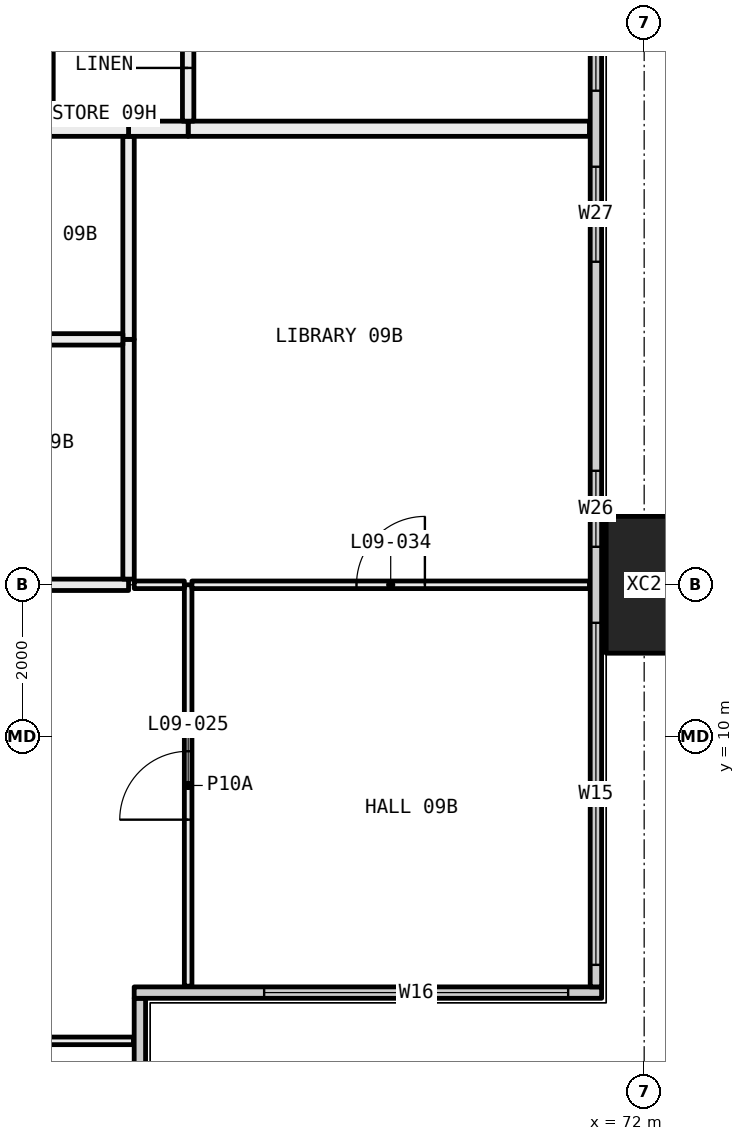
"""IFC4 building model, lengths in metres.
Left out: names, types, materials, properties, quantities, classifications, styles, units other than length and angle.
Written with IfcOpenShell. Run it as: python <this file> out.ifc"""

import sys

from ifc_helpers import new_model, si_unit, direction, frame, frame_2d, origin, origin_2d, place, context, subcontext, project, spatial, rectangle, hollow_rectangle, extrude, element, fill, save


model = new_model("IFC4")
c1 = context("Model", 3, precision=1e-05, world=origin(), true_north=direction((0.0, 1.0)))
c2 = subcontext(c1, "Body", "Model", "MODEL_VIEW")
j1 = project(units=[si_unit("LENGTHUNIT", "METRE"), si_unit("PLANEANGLEUNIT", "RADIAN")], contexts=[c1])
p1 = place(None, origin())
s1 = spatial("IfcSite", under=j1, at=p1, CompositionType="ELEMENT")
p2 = place(p1, origin())
s2 = spatial("IfcBuilding", under=s1, at=p2, CompositionType="ELEMENT")
p3 = place(p2, frame((0.0, 0.0, 43.8)))
s3 = spatial("IfcBuildingStorey", under=s2, at=p3, CompositionType="ELEMENT", Elevation=43.8)
p4 = place(p3, frame((72.0, 12.0, -0.4), z_axis=(0.0, 0.0, 1.0), x_axis=(0.0, 1.0, 0.0)))
e1 = element("IfcColumn", 1, at=p4, inside=s3, PredefinedType="COLUMN", context=c2, shape_type="SweptSolid", body=[
    extrude(hollow_rectangle(XDim=1.8, YDim=1.0, WallThickness=0.07, at=origin_2d()), origin(), (0.0, 0.0, 1.0), 3.45),
])
p5 = place(p3, frame((65.365, 0.71, 0.0), z_axis=(0.0, 0.0, 1.0), x_axis=(0.0, 1.0, 0.0)))
e2 = element("IfcWall", 2, at=p5, inside=s3, PredefinedType="ELEMENTEDWALL", context=c2, shape_type="SweptSolid", body=[
    extrude(rectangle(XDim=5.85, YDim=0.15, at=frame_2d((2.925, 0.0))), origin(), (0.0, 0.0, 1.0), 3.05),
])
p6 = place(p5, frame((0.29, 0.0, 0.45)))
e3 = element("IfcOpeningElement", 3, at=p6, cuts=e2, PredefinedType="OPENING", context=c2, shape_type="SweptSolid", body=[
    extrude(rectangle(XDim=4.0, YDim=2.55, at=frame_2d((2.0, 1.275))), frame((0.0, 0.085, 0.0), z_axis=(0.0, -1.0, 0.0), x_axis=(1.0, 0.0, 0.0)), (0.0, 0.0, 1.0), 0.17),
])
p7 = place(p3, frame((65.29, 6.635, 0.0), z_axis=(0.0, 0.0, 1.0), x_axis=(1.0, 0.0, 0.0)))
e4 = element("IfcWall", 4, at=p7, inside=s3, PredefinedType="ELEMENTEDWALL", context=c2, shape_type="SweptSolid", body=[
    extrude(rectangle(XDim=6.15, YDim=0.15, at=frame_2d((3.075, 0.0))), origin(), (0.0, 0.0, 1.0), 3.05),
])
p8 = place(p7, frame((1.71, 0.0, 0.45)))
e5 = element("IfcOpeningElement", 5, at=p8, cuts=e4, PredefinedType="OPENING", context=c2, shape_type="SweptSolid", body=[
    extrude(rectangle(XDim=4.0, YDim=2.55, at=frame_2d((2.0, 1.275))), frame((0.0, 0.085, 0.0), z_axis=(0.0, -1.0, 0.0), x_axis=(1.0, 0.0, 0.0)), (0.0, 0.0, 1.0), 0.17),
])
p9 = place(p3, frame((71.365, 6.71, 0.0), z_axis=(0.0, 0.0, 1.0), x_axis=(0.0, 1.0, 0.0)))
e6 = element("IfcWall", 6, at=p9, inside=s3, PredefinedType="ELEMENTEDWALL", context=c2, shape_type="SweptSolid", body=[
    extrude(rectangle(XDim=34.58, YDim=0.15, at=frame_2d((17.29, 0.0))), origin(), (0.0, 0.0, 1.0), 3.05),
])
p10 = place(p9, frame((0.29, 0.0, 0.45)))
e7 = element("IfcOpeningElement", 7, at=p10, cuts=e6, PredefinedType="OPENING", context=c2, shape_type="SweptSolid", body=[
    extrude(rectangle(XDim=4.5, YDim=2.55, at=frame_2d((2.25, 1.275))), frame((0.0, 0.085, 0.0), z_axis=(0.0, -1.0, 0.0), x_axis=(1.0, 0.0, 0.0)), (0.0, 0.0, 1.0), 0.17),
])
p11 = place(p9, frame((5.79, 0.0, 0.45)))
e8 = element("IfcOpeningElement", 8, at=p11, cuts=e6, PredefinedType="OPENING", context=c2, shape_type="SweptSolid", body=[
    extrude(rectangle(XDim=1.0, YDim=2.55, at=frame_2d((0.5, 1.275))), frame((0.0, 0.085, 0.0), z_axis=(0.0, -1.0, 0.0), x_axis=(1.0, 0.0, 0.0)), (0.0, 0.0, 1.0), 0.17),
])
p12 = place(p9, frame((9.54, 0.0, 0.45)))
e9 = element("IfcOpeningElement", 9, at=p12, cuts=e6, PredefinedType="OPENING", context=c2, shape_type="SweptSolid", body=[
    extrude(rectangle(XDim=1.25, YDim=2.55, at=frame_2d((0.625, 1.275))), frame((0.0, 0.085, 0.0), z_axis=(0.0, -1.0, 0.0), x_axis=(1.0, 0.0, 0.0)), (0.0, 0.0, 1.0), 0.17),
])
p13 = place(p9, frame((11.79, 0.0, 0.45)))
e10 = element("IfcOpeningElement", 10, at=p13, cuts=e6, PredefinedType="OPENING", context=c2, shape_type="SweptSolid", body=[
    extrude(rectangle(XDim=1.25, YDim=2.55, at=frame_2d((0.625, 1.275))), frame((0.0, 0.085, 0.0), z_axis=(0.0, -1.0, 0.0), x_axis=(1.0, 0.0, 0.0)), (0.0, 0.0, 1.0), 0.17),
])
p14 = place(p9, frame((15.79, 0.0, 0.45)))
e11 = element("IfcOpeningElement", 11, at=p14, cuts=e6, PredefinedType="OPENING", context=c2, shape_type="SweptSolid", body=[
    extrude(rectangle(XDim=1.0, YDim=2.55, at=frame_2d((0.5, 1.275))), frame((0.0, 0.085, 0.0), z_axis=(0.0, -1.0, 0.0), x_axis=(1.0, 0.0, 0.0)), (0.0, 0.0, 1.0), 0.17),
])
p15 = place(p9, frame((17.79, 0.0, 0.45)))
e12 = element("IfcOpeningElement", 12, at=p15, cuts=e6, PredefinedType="OPENING", context=c2, shape_type="SweptSolid", body=[
    extrude(rectangle(XDim=1.0, YDim=2.55, at=frame_2d((0.5, 1.275))), frame((0.0, 0.085, 0.0), z_axis=(0.0, -1.0, 0.0), x_axis=(1.0, 0.0, 0.0)), (0.0, 0.0, 1.0), 0.17),
])
p16 = place(p9, frame((21.54, 0.0, 0.45)))
e13 = element("IfcOpeningElement", 13, at=p16, cuts=e6, PredefinedType="OPENING", context=c2, shape_type="SweptSolid", body=[
    extrude(rectangle(XDim=1.25, YDim=2.55, at=frame_2d((0.625, 1.275))), frame((0.0, 0.085, 0.0), z_axis=(0.0, -1.0, 0.0), x_axis=(1.0, 0.0, 0.0)), (0.0, 0.0, 1.0), 0.17),
])
p17 = place(p9, frame((23.79, 0.0, 0.45)))
e14 = element("IfcOpeningElement", 14, at=p17, cuts=e6, PredefinedType="OPENING", context=c2, shape_type="SweptSolid", body=[
    extrude(rectangle(XDim=1.25, YDim=2.55, at=frame_2d((0.625, 1.275))), frame((0.0, 0.085, 0.0), z_axis=(0.0, -1.0, 0.0), x_axis=(1.0, 0.0, 0.0)), (0.0, 0.0, 1.0), 0.17),
])
p18 = place(p9, frame((27.79, 0.0, 0.45)))
e15 = element("IfcOpeningElement", 15, at=p18, cuts=e6, PredefinedType="OPENING", context=c2, shape_type="SweptSolid", body=[
    extrude(rectangle(XDim=1.0, YDim=2.55, at=frame_2d((0.5, 1.275))), frame((0.0, 0.085, 0.0), z_axis=(0.0, -1.0, 0.0), x_axis=(1.0, 0.0, 0.0)), (0.0, 0.0, 1.0), 0.17),
])
p19 = place(p9, frame((29.79, 0.0, 0.45)))
e16 = element("IfcOpeningElement", 16, at=p19, cuts=e6, PredefinedType="OPENING", context=c2, shape_type="SweptSolid", body=[
    extrude(rectangle(XDim=4.5, YDim=2.55, at=frame_2d((2.25, 1.275))), frame((0.0, 0.085, 0.0), z_axis=(0.0, -1.0, 0.0), x_axis=(1.0, 0.0, 0.0)), (0.0, 0.0, 1.0), 0.17),
])
p20 = place(p3, frame((65.28, 6.0, 0.0), z_axis=(0.0, 0.0, 1.0), x_axis=(-1.0, 0.0, 0.0)))
e17 = element("IfcWall", 17, at=p20, inside=s3, PredefinedType="PARTITIONING", context=c2, shape_type="SweptSolid", body=[
    extrude(rectangle(XDim=5.23, YDim=0.1, at=frame_2d((2.615, 0.0))), origin(), (0.0, 0.0, 1.0), 2.45),
])
p21 = place(p20, frame((2.165, 0.0, 0.0)))
e18 = element("IfcOpeningElement", 18, at=p21, cuts=e17, PredefinedType="OPENING", context=c2, shape_type="SweptSolid", body=[
    extrude(rectangle(XDim=0.9, YDim=2.1, at=frame_2d((0.45, 1.05))), frame((0.0, 0.06, 0.0), z_axis=(0.0, -1.0, 0.0), x_axis=(1.0, 0.0, 0.0)), (0.0, 0.0, 1.0), 0.12),
])
p22 = place(p3, frame((66.0, 6.72, 0.0), z_axis=(0.0, 0.0, 1.0), x_axis=(0.0, 1.0, 0.0)))
e19 = element("IfcWall", 19, at=p22, inside=s3, PredefinedType="PARTITIONING", context=c2, shape_type="SweptSolid", body=[
    extrude(rectangle(XDim=5.28, YDim=0.1, at=frame_2d((2.64, 0.0))), origin(), (0.0, 0.0, 1.0), 2.45),
])
p23 = place(p22, frame((2.19, 0.0, 0.0)))
e20 = element("IfcOpeningElement", 20, at=p23, cuts=e19, PredefinedType="OPENING", context=c2, shape_type="SweptSolid", body=[
    extrude(rectangle(XDim=0.9, YDim=2.1, at=frame_2d((0.45, 1.05))), frame((0.0, 0.06, 0.0), z_axis=(0.0, -1.0, 0.0), x_axis=(1.0, 0.0, 0.0)), (0.0, 0.0, 1.0), 0.12),
])
p24 = place(p3, frame((65.95, 12.0, 0.0), z_axis=(0.0, 0.0, 1.0), x_axis=(-1.0, 0.0, 0.0)))
e21 = element("IfcWall", 21, at=p24, inside=s3, PredefinedType="PARTITIONING", context=c2, shape_type="SweptSolid", body=[
    extrude(rectangle(XDim=0.659, YDim=0.1, at=frame_2d((0.33, 0.0))), origin(), (0.0, 0.0, 1.0), 2.45),
])
p25 = place(p3, frame((65.216, 12.0, 0.0), z_axis=(0.0, 0.0, 1.0), x_axis=(-1.0, 0.0, 0.0)))
e22 = element("IfcWall", 22, at=p25, inside=s3, PredefinedType="PARTITIONING", context=c2, shape_type="SweptSolid", body=[
    extrude(rectangle(XDim=3.716, YDim=0.15, at=frame_2d((1.858, 0.0))), origin(), (0.0, 0.0, 1.0), 2.45),
])
p26 = place(p25, frame((1.408, 0.0, 0.0)))
e23 = element("IfcOpeningElement", 23, at=p26, cuts=e22, PredefinedType="OPENING", context=c2, shape_type="SweptSolid", body=[
    extrude(rectangle(XDim=0.9, YDim=2.1, at=frame_2d((0.45, 1.05))), frame((0.0, 0.085, 0.0), z_axis=(0.0, -1.0, 0.0), x_axis=(1.0, 0.0, 0.0)), (0.0, 0.0, 1.0), 0.17),
])
p27 = place(p3, frame((71.28, 12.0, 0.0), z_axis=(0.0, 0.0, 1.0), x_axis=(-1.0, 0.0, 0.0)))
e24 = element("IfcWall", 24, at=p27, inside=s3, PredefinedType="PARTITIONING", context=c2, shape_type="SweptSolid", body=[
    extrude(rectangle(XDim=5.23, YDim=0.1, at=frame_2d((2.615, 0.0))), origin(), (0.0, 0.0, 1.0), 2.45),
])
p28 = place(p27, frame((2.165, 0.0, 0.0)))
e25 = element("IfcOpeningElement", 25, at=p28, cuts=e24, PredefinedType="OPENING", context=c2, shape_type="SweptSolid", body=[
    extrude(rectangle(XDim=0.9, YDim=2.1, at=frame_2d((0.45, 1.05))), frame((0.0, 0.06, 0.0), z_axis=(0.0, -1.0, 0.0), x_axis=(1.0, 0.0, 0.0)), (0.0, 0.0, 1.0), 0.12),
])
p29 = place(p3, frame((65.216, 15.229, 0.0), z_axis=(0.0, 0.0, 1.0), x_axis=(0.0, -1.0, 0.0)))
e26 = element("IfcWall", 26, at=p29, inside=s3, PredefinedType="PARTITIONING", context=c2, shape_type="SweptSolid", body=[
    extrude(rectangle(XDim=3.154, YDim=0.15, at=frame_2d((1.577, 0.0))), origin(), (0.0, 0.0, 1.0), 2.45),
])
p30 = place(p3, frame((65.216, 17.9, 0.0), z_axis=(0.0, 0.0, 1.0), x_axis=(0.0, -1.0, 0.0)))
e27 = element("IfcWall", 27, at=p30, inside=s3, PredefinedType="PARTITIONING", context=c2, shape_type="SweptSolid", body=[
    extrude(rectangle(XDim=2.671, YDim=0.15, at=frame_2d((1.335, 0.0))), origin(), (0.0, 0.0, 1.0), 3.05),
])
p31 = place(p3, frame((71.28, 18.0, 0.0), z_axis=(0.0, 0.0, 1.0), x_axis=(-1.0, 0.0, 0.0)))
e28 = element("IfcWall", 28, at=p31, inside=s3, PredefinedType="PARTITIONING", context=c2, shape_type="SweptSolid", body=[
    extrude(rectangle(XDim=5.28, YDim=0.2, at=frame_2d((2.64, 0.0))), origin(), (0.0, 0.0, 1.0), 3.05),
])
p32 = place(p3, frame((66.0, 18.0, 0.0), z_axis=(0.0, 0.0, 1.0), x_axis=(-1.0, 0.0, 0.0)))
e29 = element("IfcWall", 29, at=p32, inside=s3, PredefinedType="PARTITIONING", context=c2, shape_type="SweptSolid", body=[
    extrude(rectangle(XDim=0.784, YDim=0.2, at=frame_2d((0.392, 0.0))), origin(), (0.0, 0.0, 1.0), 3.05),
])
p33 = place(p3, frame((65.141, 15.229, 0.0), z_axis=(0.0, 0.0, 1.0), x_axis=(-1.0, 0.0, 0.0)))
e30 = element("IfcWall", 30, at=p33, inside=s3, PredefinedType="PARTITIONING", context=c2, shape_type="SweptSolid", body=[
    extrude(rectangle(XDim=3.566, YDim=0.15, at=frame_2d((1.783, 0.0))), origin(), (0.0, 0.0, 1.0), 3.05),
])
p34 = place(p3, frame((65.216, 18.0, 0.0), z_axis=(0.0, 0.0, 1.0), x_axis=(-1.0, 0.0, 0.0)))
e31 = element("IfcWall", 31, at=p34, inside=s3, PredefinedType="PARTITIONING", context=c2, shape_type="SweptSolid", body=[
    extrude(rectangle(XDim=1.066, YDim=0.2, at=frame_2d((0.533, 0.0))), origin(), (0.0, 0.0, 1.0), 3.05),
])
p35 = place(p3, frame((66.0, 20.4, 0.0), z_axis=(0.0, 0.0, 1.0), x_axis=(0.0, -1.0, 0.0)))
e32 = element("IfcWall", 32, at=p35, inside=s3, PredefinedType="PARTITIONING", context=c2, shape_type="SweptSolid", body=[
    extrude(rectangle(XDim=2.3, YDim=0.15, at=frame_2d((1.15, 0.0))), origin(), (0.0, 0.0, 1.0), 3.05),
])
p36 = place(p35, frame((0.7, 0.0, 0.0)))
e33 = element("IfcOpeningElement", 33, at=p36, cuts=e32, PredefinedType="OPENING", context=c2, shape_type="SweptSolid", body=[
    extrude(rectangle(XDim=0.9, YDim=2.1, at=frame_2d((0.45, 1.05))), frame((0.0, 0.085, 0.0), z_axis=(0.0, -1.0, 0.0), x_axis=(1.0, 0.0, 0.0)), (0.0, 0.0, 1.0), 0.17),
])
p37 = place(p3, frame((64.15, 18.1, 0.0), z_axis=(0.0, 0.0, 1.0), x_axis=(0.0, 1.0, 0.0)))
e34 = element("IfcWall", 34, at=p37, inside=s3, PredefinedType="PARTITIONING", context=c2, shape_type="SweptSolid", body=[
    extrude(rectangle(XDim=2.3, YDim=0.15, at=frame_2d((1.15, 0.0))), origin(), (0.0, 0.0, 1.0), 3.05),
])
p38 = place(p8, origin())
e35 = element("IfcWindow", 35, at=p38, inside=s3, PartitioningType="SINGLE_PANEL", PredefinedType="WINDOW", context=c2, shape_type="SweptSolid", body=[
    extrude(rectangle(XDim=4.0, YDim=2.55, at=frame_2d((2.0, 1.275))), frame((0.0, 0.03, 0.0), z_axis=(0.0, -1.0, 0.0), x_axis=(1.0, 0.0, 0.0)), (0.0, 0.0, 1.0), 0.06),
])
fill(e5, e35)
p39 = place(p10, origin())
e36 = element("IfcWindow", 36, at=p39, inside=s3, PartitioningType="SINGLE_PANEL", PredefinedType="WINDOW", context=c2, shape_type="SweptSolid", body=[
    extrude(rectangle(XDim=4.5, YDim=2.55, at=frame_2d((2.25, 1.275))), frame((0.0, 0.03, 0.0), z_axis=(0.0, -1.0, 0.0), x_axis=(1.0, 0.0, 0.0)), (0.0, 0.0, 1.0), 0.06),
])
fill(e7, e36)
p40 = place(p11, origin())
e37 = element("IfcWindow", 37, at=p40, inside=s3, PartitioningType="SINGLE_PANEL", PredefinedType="WINDOW", context=c2, shape_type="SweptSolid", body=[
    extrude(rectangle(XDim=1.0, YDim=2.55, at=frame_2d((0.5, 1.275))), frame((0.0, 0.03, 0.0), z_axis=(0.0, -1.0, 0.0), x_axis=(1.0, 0.0, 0.0)), (0.0, 0.0, 1.0), 0.06),
])
fill(e8, e37)
p41 = place(p12, origin())
e38 = element("IfcWindow", 38, at=p41, inside=s3, PartitioningType="SINGLE_PANEL", PredefinedType="WINDOW", context=c2, shape_type="SweptSolid", body=[
    extrude(rectangle(XDim=1.25, YDim=2.55, at=frame_2d((0.625, 1.275))), frame((0.0, 0.03, 0.0), z_axis=(0.0, -1.0, 0.0), x_axis=(1.0, 0.0, 0.0)), (0.0, 0.0, 1.0), 0.06),
])
fill(e9, e38)
p42 = place(p13, origin())
e39 = element("IfcWindow", 39, at=p42, inside=s3, PartitioningType="SINGLE_PANEL", PredefinedType="WINDOW", context=c2, shape_type="SweptSolid", body=[
    extrude(rectangle(XDim=1.25, YDim=2.55, at=frame_2d((0.625, 1.275))), frame((0.0, 0.03, 0.0), z_axis=(0.0, -1.0, 0.0), x_axis=(1.0, 0.0, 0.0)), (0.0, 0.0, 1.0), 0.06),
])
fill(e10, e39)
p43 = place(p23, origin())
e40 = element("IfcDoor", 40, at=p43, inside=s3, OperationType="SINGLE_SWING_RIGHT", PredefinedType="DOOR", context=c2, shape_type="SweptSolid", body=[
    extrude(rectangle(XDim=0.9, YDim=2.1, at=frame_2d((0.45, 1.05))), frame((0.0, 0.025, 0.0), z_axis=(0.0, -1.0, 0.0), x_axis=(1.0, 0.0, 0.0)), (0.0, 0.0, 1.0), 0.05),
])
fill(e20, e40)
p44 = place(p28, frame((0.9, 0.0, 0.0), x_axis=(-1.0, 0.0, 0.0)))
e41 = element("IfcDoor", 41, at=p44, inside=s3, OperationType="SINGLE_SWING_LEFT", PredefinedType="DOOR", context=c2, shape_type="SweptSolid", body=[
    extrude(rectangle(XDim=0.9, YDim=2.1, at=frame_2d((0.45, 1.05))), frame((0.0, 0.025, 0.0), z_axis=(0.0, -1.0, 0.0), x_axis=(1.0, 0.0, 0.0)), (0.0, 0.0, 1.0), 0.05),
])
fill(e25, e41)
p45 = place(p36, frame((0.9, 0.0, 0.0), x_axis=(-1.0, 0.0, 0.0)))
e42 = element("IfcDoor", 42, at=p45, inside=s3, OperationType="SINGLE_SWING_RIGHT", PredefinedType="DOOR", context=c2, shape_type="SweptSolid", body=[
    extrude(rectangle(XDim=0.9, YDim=2.1, at=frame_2d((0.45, 1.05))), frame((0.0, 0.025, 0.0), z_axis=(0.0, -1.0, 0.0), x_axis=(1.0, 0.0, 0.0)), (0.0, 0.0, 1.0), 0.05),
])
fill(e33, e42)
save(model, sys.argv[1])
